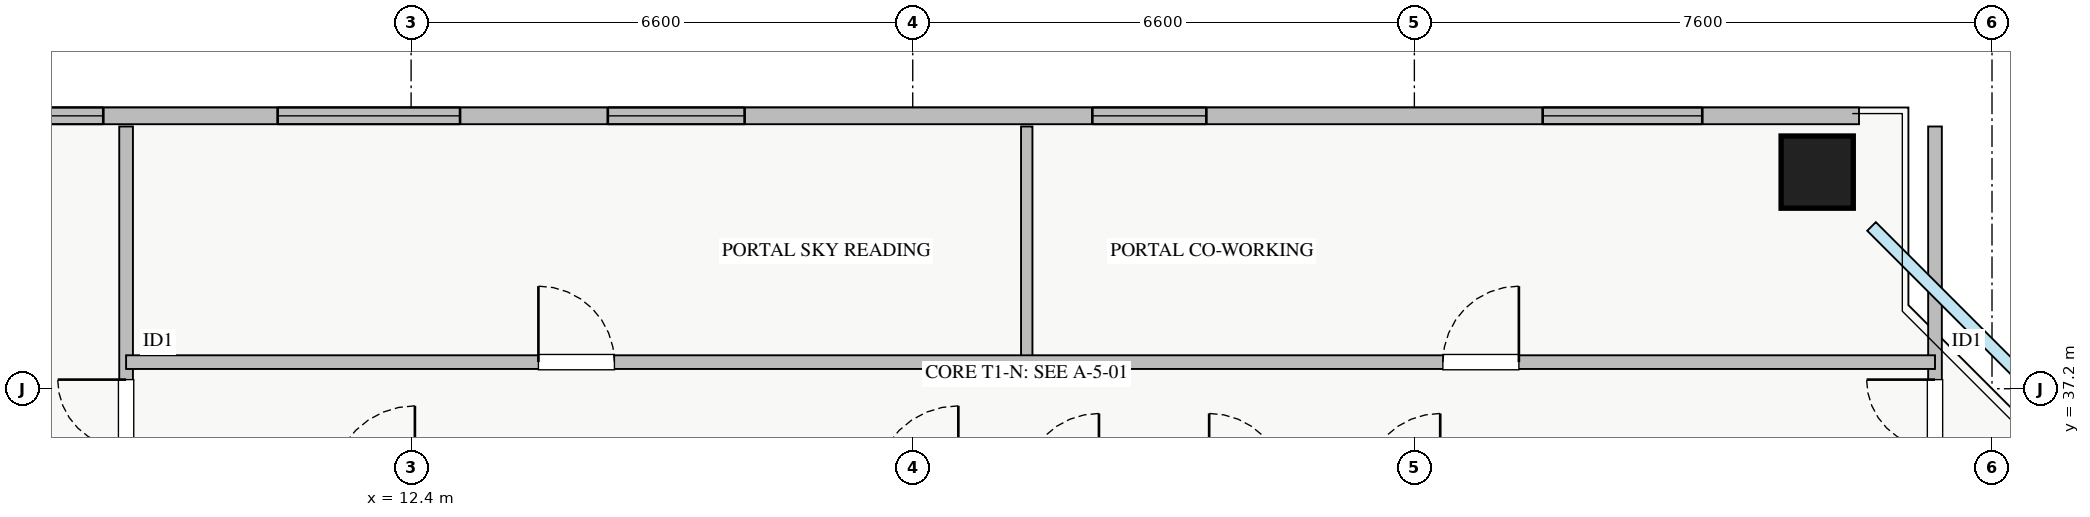
"""IFC4 building model, lengths in metres.
Left out: names, types, materials, properties, quantities, classifications, styles, units other than length and angle.
Written with IfcOpenShell. Run it as: python <this file> out.ifc"""

import sys

from ifc_helpers import new_model, si_unit, direction, frame, frame_2d, origin, origin_2d, place, context, subcontext, project, spatial, rectangle, extrude, source, transform, mapped, element, fill, save


model = new_model("IFC4")
c1 = context("Model", 3, precision=1e-05, world=origin(), true_north=direction((0.0, 1.0)))
c2 = subcontext(c1, "Body", "Model", "MODEL_VIEW")
j1 = project(units=[si_unit("LENGTHUNIT", "METRE"), si_unit("PLANEANGLEUNIT", "RADIAN")], contexts=[c1])
p1 = place(None, origin())
s1 = spatial("IfcSite", under=j1, at=p1, CompositionType="ELEMENT")
p2 = place(p1, origin())
s2 = spatial("IfcBuilding", under=s1, at=p2, CompositionType="ELEMENT")
p3 = place(p2, frame((0.0, 0.0, 160.0)))
s3 = spatial("IfcBuildingStorey", under=s2, at=p3, CompositionType="ELEMENT", Elevation=160.0)
m1 = source(origin(), c2, "Body", "SweptSolid", [
    extrude(rectangle(XDim=0.95, YDim=0.95, at=origin_2d()), origin(), (0.0, 0.0, 1.0), 3.25),
])
p4 = place(p3, frame((30.9, 40.05, 0.0), z_axis=(0.0, 0.0, 1.0), x_axis=(1.0, 0.0, 0.0)))
e1 = element("IfcColumn", 1, at=p4, inside=s3, PredefinedType="COLUMN", context=c2, shape_type="MappedRepresentation", body=[
    mapped(m1, transform((0.0, 0.0, 0.0), x_axis=(1.0, 0.0, 0.0), y_axis=(0.0, 1.0, 0.0), z_axis=(0.0, 0.0, 1.0), scale=1.0)),
])
p5 = place(p3, frame((6.55, 40.79, 0.0), z_axis=(0.0, 0.0, 1.0), x_axis=(1.0, 0.0, 0.0)))
e2 = element("IfcWall", 2, at=p5, inside=s3, PredefinedType="STANDARD", context=c2, shape_type="SweptSolid", body=[
    extrude(rectangle(XDim=24.9, YDim=0.22, at=frame_2d((12.45, 0.0))), origin(), (0.0, 0.0, 1.0), 2.61),
])
p6 = place(p5, frame((0.3, 0.0, 0.9)))
e3 = element("IfcOpeningElement", 3, at=p6, cuts=e2, PredefinedType="OPENING", context=c2, shape_type="SweptSolid", body=[
    extrude(rectangle(XDim=1.5, YDim=1.5, at=frame_2d((0.75, 0.75))), frame((0.0, 0.12, 0.0), z_axis=(0.0, -1.0, 0.0), x_axis=(1.0, 0.0, 0.0)), (0.0, 0.0, 1.0), 0.24),
])
p7 = place(p5, frame((8.438, 0.0, 0.9)))
e4 = element("IfcOpeningElement", 4, at=p7, cuts=e2, PredefinedType="OPENING", context=c2, shape_type="SweptSolid", body=[
    extrude(rectangle(XDim=1.8, YDim=1.45, at=frame_2d((0.9, 0.725))), frame((0.0, 0.12, 0.0), z_axis=(0.0, -1.0, 0.0), x_axis=(1.0, 0.0, 0.0)), (0.0, 0.0, 1.0), 0.24),
])
p8 = place(p5, frame((14.813, 0.0, 0.9)))
e5 = element("IfcOpeningElement", 5, at=p8, cuts=e2, PredefinedType="OPENING", context=c2, shape_type="SweptSolid", body=[
    extrude(rectangle(XDim=1.5, YDim=1.45, at=frame_2d((0.75, 0.725))), frame((0.0, 0.12, 0.0), z_axis=(0.0, -1.0, 0.0), x_axis=(1.0, 0.0, 0.0)), (0.0, 0.0, 1.0), 0.24),
])
p9 = place(p5, frame((20.738, 0.0, 0.9)))
e6 = element("IfcOpeningElement", 6, at=p9, cuts=e2, PredefinedType="OPENING", context=c2, shape_type="SweptSolid", body=[
    extrude(rectangle(XDim=2.1, YDim=1.48, at=frame_2d((1.05, 0.74))), frame((0.0, 0.12, 0.0), z_axis=(0.0, -1.0, 0.0), x_axis=(1.0, 0.0, 0.0)), (0.0, 0.0, 1.0), 0.24),
])
p10 = place(p5, frame((4.094, 0.0, 0.9)))
e7 = element("IfcOpeningElement", 7, at=p10, cuts=e2, PredefinedType="OPENING", context=c2, shape_type="SweptSolid", body=[
    extrude(rectangle(XDim=2.4, YDim=1.5, at=frame_2d((1.2, 0.75))), frame((0.0, 0.12, 0.0), z_axis=(0.0, -1.0, 0.0), x_axis=(1.0, 0.0, 0.0)), (0.0, 0.0, 1.0), 0.24),
])
p11 = place(p3, frame((8.65, 29.3, 0.0), z_axis=(0.0, 0.0, 1.0), x_axis=(0.0, 1.0, 0.0)))
e8 = element("IfcWall", 8, at=p11, inside=s3, PredefinedType="PARTITIONING", context=c2, shape_type="SweptSolid", body=[
    extrude(rectangle(XDim=11.35, YDim=0.18, at=frame_2d((5.675, 0.0))), origin(), (0.0, 0.0, 1.0), 3.07),
])
p12 = place(p11, frame((0.915, 0.0, 0.0)))
e9 = element("IfcOpeningElement", 9, at=p12, cuts=e8, PredefinedType="OPENING", context=c2, shape_type="SweptSolid", body=[
    extrude(rectangle(XDim=1.0, YDim=2.05, at=frame_2d((0.5, 1.025))), frame((0.0, 0.1, 0.0), z_axis=(0.0, -1.0, 0.0), x_axis=(1.0, 0.0, 0.0)), (0.0, 0.0, 1.0), 0.2),
])
p13 = place(p11, frame((7.12, 0.0, 0.0)))
e10 = element("IfcOpeningElement", 10, at=p13, cuts=e8, PredefinedType="OPENING", context=c2, shape_type="SweptSolid", body=[
    extrude(rectangle(XDim=0.9, YDim=2.05, at=frame_2d((0.45, 1.025))), frame((0.0, 0.1, 0.0), z_axis=(0.0, -1.0, 0.0), x_axis=(1.0, 0.0, 0.0)), (0.0, 0.0, 1.0), 0.2),
])
p14 = place(p3, frame((32.45, 29.3, 0.0), z_axis=(0.0, 0.0, 1.0), x_axis=(0.0, 1.0, 0.0)))
e11 = element("IfcWall", 11, at=p14, inside=s3, PredefinedType="PARTITIONING", context=c2, shape_type="SweptSolid", body=[
    extrude(rectangle(XDim=11.35, YDim=0.18, at=frame_2d((5.675, 0.0))), origin(), (0.0, 0.0, 1.0), 3.07),
])
p15 = place(p14, frame((1.115, 0.0, 0.0)))
e12 = element("IfcOpeningElement", 12, at=p15, cuts=e11, PredefinedType="OPENING", context=c2, shape_type="SweptSolid", body=[
    extrude(rectangle(XDim=1.0, YDim=2.05, at=frame_2d((0.5, 1.025))), frame((0.0, 0.1, 0.0), z_axis=(0.0, -1.0, 0.0), x_axis=(1.0, 0.0, 0.0)), (0.0, 0.0, 1.0), 0.2),
])
p16 = place(p14, frame((7.12, 0.0, 0.0)))
e13 = element("IfcOpeningElement", 13, at=p16, cuts=e11, PredefinedType="OPENING", context=c2, shape_type="SweptSolid", body=[
    extrude(rectangle(XDim=0.9, YDim=2.05, at=frame_2d((0.45, 1.025))), frame((0.0, 0.1, 0.0), z_axis=(0.0, -1.0, 0.0), x_axis=(1.0, 0.0, 0.0)), (0.0, 0.0, 1.0), 0.2),
])
p17 = place(p3, frame((20.5, 37.55, 0.0), z_axis=(0.0, 0.0, 1.0), x_axis=(0.0, 1.0, 0.0)))
e14 = element("IfcWall", 14, at=p17, inside=s3, PredefinedType="PARTITIONING", context=c2, shape_type="SweptSolid", body=[
    extrude(rectangle(XDim=3.1, YDim=0.15, at=frame_2d((1.55, 0.0))), origin(), (0.0, 0.0, 1.0), 3.07),
])
p18 = place(p3, frame((8.65, 37.55, 0.0), z_axis=(0.0, 0.0, 1.0), x_axis=(1.0, 0.0, 0.0)))
e15 = element("IfcWall", 15, at=p18, inside=s3, PredefinedType="PARTITIONING", context=c2, shape_type="SweptSolid", body=[
    extrude(rectangle(XDim=23.8, YDim=0.18, at=frame_2d((11.9, 0.0))), origin(), (0.0, 0.0, 1.0), 3.07),
])
p19 = place(p18, frame((5.425, 0.0, 0.0)))
e16 = element("IfcOpeningElement", 16, at=p19, cuts=e15, PredefinedType="OPENING", context=c2, shape_type="SweptSolid", body=[
    extrude(rectangle(XDim=1.0, YDim=2.05, at=frame_2d((0.5, 1.025))), frame((0.0, 0.1, 0.0), z_axis=(0.0, -1.0, 0.0), x_axis=(1.0, 0.0, 0.0)), (0.0, 0.0, 1.0), 0.2),
])
p20 = place(p18, frame((17.325, 0.0, 0.0)))
e17 = element("IfcOpeningElement", 17, at=p20, cuts=e15, PredefinedType="OPENING", context=c2, shape_type="SweptSolid", body=[
    extrude(rectangle(XDim=1.0, YDim=2.05, at=frame_2d((0.5, 1.025))), frame((0.0, 0.1, 0.0), z_axis=(0.0, -1.0, 0.0), x_axis=(1.0, 0.0, 0.0)), (0.0, 0.0, 1.0), 0.2),
])
m2 = source(origin(), c2, "Body", "SweptSolid", [
    extrude(rectangle(XDim=1.5, YDim=1.5, at=frame_2d((0.75, 0.75))), frame((0.0, 0.03, 0.0), z_axis=(0.0, -1.0, 0.0), x_axis=(1.0, 0.0, 0.0)), (0.0, 0.0, 1.0), 0.06),
])
p21 = place(p6, origin())
e18 = element("IfcWindow", 18, at=p21, inside=s3, PartitioningType="TRIPLE_PANEL_VERTICAL", PredefinedType="WINDOW", context=c2, shape_type="MappedRepresentation", body=[
    mapped(m2, transform((0.0, 0.0, 0.0), x_axis=(1.0, 0.0, 0.0), y_axis=(0.0, 1.0, 0.0), z_axis=(0.0, 0.0, 1.0), scale=1.0)),
])
fill(e3, e18)
m3 = source(origin(), c2, "Body", "SweptSolid", [
    extrude(rectangle(XDim=1.8, YDim=1.45, at=frame_2d((0.9, 0.725))), frame((0.0, 0.03, 0.0), z_axis=(0.0, -1.0, 0.0), x_axis=(1.0, 0.0, 0.0)), (0.0, 0.0, 1.0), 0.06),
])
p22 = place(p7, origin())
e19 = element("IfcWindow", 19, at=p22, inside=s3, PartitioningType="DOUBLE_PANEL_VERTICAL", PredefinedType="WINDOW", context=c2, shape_type="MappedRepresentation", body=[
    mapped(m3, transform((0.0, 0.0, 0.0), x_axis=(1.0, 0.0, 0.0), y_axis=(0.0, 1.0, 0.0), z_axis=(0.0, 0.0, 1.0), scale=1.0)),
])
fill(e4, e19)
m4 = source(origin(), c2, "Body", "SweptSolid", [
    extrude(rectangle(XDim=1.5, YDim=1.45, at=frame_2d((0.75, 0.725))), frame((0.0, 0.03, 0.0), z_axis=(0.0, -1.0, 0.0), x_axis=(1.0, 0.0, 0.0)), (0.0, 0.0, 1.0), 0.06),
])
p23 = place(p8, origin())
e20 = element("IfcWindow", 20, at=p23, inside=s3, PartitioningType="DOUBLE_PANEL_VERTICAL", PredefinedType="WINDOW", context=c2, shape_type="MappedRepresentation", body=[
    mapped(m4, transform((0.0, 0.0, 0.0), x_axis=(1.0, 0.0, 0.0), y_axis=(0.0, 1.0, 0.0), z_axis=(0.0, 0.0, 1.0), scale=1.0)),
])
fill(e5, e20)
m5 = source(origin(), c2, "Body", "SweptSolid", [
    extrude(rectangle(XDim=2.1, YDim=1.48, at=frame_2d((1.05, 0.74))), frame((0.0, 0.03, 0.0), z_axis=(0.0, -1.0, 0.0), x_axis=(1.0, 0.0, 0.0)), (0.0, 0.0, 1.0), 0.06),
])
p24 = place(p9, origin())
e21 = element("IfcWindow", 21, at=p24, inside=s3, PartitioningType="TRIPLE_PANEL_VERTICAL", PredefinedType="WINDOW", context=c2, shape_type="MappedRepresentation", body=[
    mapped(m5, transform((0.0, 0.0, 0.0), x_axis=(1.0, 0.0, 0.0), y_axis=(0.0, 1.0, 0.0), z_axis=(0.0, 0.0, 1.0), scale=1.0)),
])
fill(e6, e21)
m6 = source(origin(), c2, "Body", "SweptSolid", [
    extrude(rectangle(XDim=0.9, YDim=2.05, at=frame_2d((0.45, 1.025))), frame((0.0, 0.025, 0.0), z_axis=(0.0, -1.0, 0.0), x_axis=(1.0, 0.0, 0.0)), (0.0, 0.0, 1.0), 0.05),
])
p25 = place(p13, origin())
e22 = element("IfcDoor", 22, at=p25, inside=s3, OperationType="SINGLE_SWING_RIGHT", PredefinedType="DOOR", context=c2, shape_type="MappedRepresentation", body=[
    mapped(m6, transform((0.0, 0.0, 0.0), x_axis=(1.0, 0.0, 0.0), y_axis=(0.0, 1.0, 0.0), z_axis=(0.0, 0.0, 1.0), scale=1.0)),
])
fill(e10, e22)
p26 = place(p16, origin())
e23 = element("IfcDoor", 23, at=p26, inside=s3, OperationType="SINGLE_SWING_RIGHT", PredefinedType="DOOR", context=c2, shape_type="MappedRepresentation", body=[
    mapped(m6, transform((0.0, 0.0, 0.0), x_axis=(1.0, 0.0, 0.0), y_axis=(0.0, 1.0, 0.0), z_axis=(0.0, 0.0, 1.0), scale=1.0)),
])
fill(e13, e23)
m7 = source(origin(), c2, "Body", "SweptSolid", [
    extrude(rectangle(XDim=1.0, YDim=2.05, at=frame_2d((0.5, 1.025))), frame((0.0, 0.025, 0.0), z_axis=(0.0, -1.0, 0.0), x_axis=(1.0, 0.0, 0.0)), (0.0, 0.0, 1.0), 0.05),
])
p27 = place(p19, origin())
e24 = element("IfcDoor", 24, at=p27, inside=s3, OperationType="SINGLE_SWING_LEFT", PredefinedType="DOOR", context=c2, shape_type="MappedRepresentation", body=[
    mapped(m7, transform((0.0, 0.0, 0.0), x_axis=(1.0, 0.0, 0.0), y_axis=(0.0, 1.0, 0.0), z_axis=(0.0, 0.0, 1.0), scale=1.0)),
])
fill(e16, e24)
p28 = place(p20, origin())
e25 = element("IfcDoor", 25, at=p28, inside=s3, OperationType="SINGLE_SWING_RIGHT", PredefinedType="DOOR", context=c2, shape_type="MappedRepresentation", body=[
    mapped(m7, transform((0.0, 0.0, 0.0), x_axis=(1.0, 0.0, 0.0), y_axis=(0.0, 1.0, 0.0), z_axis=(0.0, 0.0, 1.0), scale=1.0)),
])
fill(e17, e25)
m8 = source(origin(), c2, "Body", "SweptSolid", [
    extrude(rectangle(XDim=2.4, YDim=1.5, at=frame_2d((1.2, 0.75))), frame((0.0, 0.03, 0.0), z_axis=(0.0, -1.0, 0.0), x_axis=(1.0, 0.0, 0.0)), (0.0, 0.0, 1.0), 0.06),
])
p29 = place(p10, origin())
e26 = element("IfcWindow", 26, at=p29, inside=s3, PartitioningType="TRIPLE_PANEL_VERTICAL", PredefinedType="WINDOW", context=c2, shape_type="MappedRepresentation", body=[
    mapped(m8, transform((0.0, 0.0, 0.0), x_axis=(1.0, 0.0, 0.0), y_axis=(0.0, 1.0, 0.0), z_axis=(0.0, 0.0, 1.0), scale=1.0)),
])
fill(e7, e26)
save(model, sys.argv[1])
